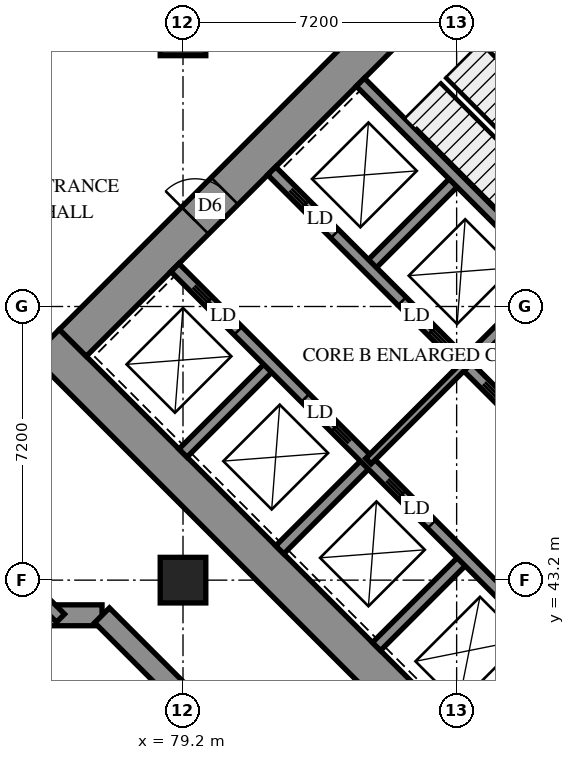
"""IFC4 building model, lengths in metres.
Left out: names, types, materials, properties, quantities, classifications, styles, units other than length and angle.
Written with IfcOpenShell. Run it as: python <this file> out.ifc"""

import sys

from ifc_helpers import new_model, si_unit, direction, frame, frame_2d, origin, origin_2d, place, context, subcontext, project, spatial, polyline, rectangle, outline, extrude, element, fill, save


model = new_model("IFC4")
c1 = context("Model", 3, precision=1e-05, world=origin(), true_north=direction((0.0, 1.0)))
c2 = subcontext(c1, "Body", "Model", "MODEL_VIEW")
j1 = project(units=[si_unit("LENGTHUNIT", "METRE"), si_unit("PLANEANGLEUNIT", "RADIAN")], contexts=[c1])
p1 = place(None, origin())
s1 = spatial("IfcSite", under=j1, at=p1, CompositionType="ELEMENT")
p2 = place(p1, origin())
s2 = spatial("IfcBuilding", under=s1, at=p2, CompositionType="ELEMENT")
p3 = place(p2, origin())
s3 = spatial("IfcBuildingStorey", under=s2, at=p3, CompositionType="ELEMENT", Elevation=0.0)
for number, where, z_axis, x_axis in (
    (1, (79.2, 43.2, 0.0), (0.0, 0.0, 1.0), (1.0, 0.0, 0.0)),
    (2, (79.2, 57.6, 0.0), (0.0, 0.0, 1.0), (1.0, 0.0, 0.0)),
):
    element("IfcColumn", number, at=place(p3, frame(where, z_axis=z_axis, x_axis=x_axis)), inside=s3, PredefinedType="COLUMN", context=c2, shape_type="SweptSolid", body=[
        extrude(rectangle(XDim=1.2, YDim=1.2, at=origin_2d()), origin(), (0.0, 0.0, 1.0), 5.6),
    ])
p4 = place(p3, frame((75.594, 49.443, -0.4), z_axis=(0.0, 0.0, 1.0), x_axis=(0.7071037324, -0.70710983, 0.0)))
e3 = element("IfcWall", 3, at=p4, inside=s3, PredefinedType="SHEAR", context=c2, shape_type="SweptSolid", body=[
    extrude(rectangle(XDim=16.4, YDim=1.0, at=frame_2d((8.2, 0.0))), origin(), (0.0, 0.0, 1.0), 5.3),
])
p5 = place(p3, frame((86.483, 60.333, -0.4), z_axis=(0.0, 0.0, 1.0), x_axis=(0.70710983, -0.7071037324, 0.0)))
e4 = element("IfcWall", 4, at=p5, inside=s3, PredefinedType="SHEAR", context=c2, shape_type="SweptSolid", body=[
    extrude(rectangle(XDim=16.4, YDim=1.0, at=frame_2d((8.2, 0.0))), origin(), (0.0, 0.0, 1.0), 5.3),
])
p6 = place(p5, frame((11.0, 0.0, 0.4)))
e5 = element("IfcOpeningElement", 5, at=p6, cuts=e4, PredefinedType="OPENING", context=c2, shape_type="SweptSolid", body=[
    extrude(rectangle(XDim=0.8, YDim=2.1, at=frame_2d((0.4, 1.05))), frame((0.0, 0.51, 0.0), z_axis=(0.0, -1.0, 0.0), x_axis=(1.0, 0.0, 0.0)), (0.0, 0.0, 1.0), 1.02),
])
p7 = place(p3, frame((76.301, 49.443, -0.4), z_axis=(0.0, 0.0, 1.0), x_axis=(0.7071067812, 0.7071067812, 0.0)))
e6 = element("IfcWall", 6, at=p7, inside=s3, PredefinedType="SHEAR", context=c2, shape_type="SweptSolid", body=[
    extrude(rectangle(XDim=14.4, YDim=1.0, at=frame_2d((7.2, 0.0))), origin(), (0.0, 0.0, 1.0), 5.3),
])
p8 = place(p7, frame((4.55, 0.0, 0.4)))
e7 = element("IfcOpeningElement", 7, at=p8, cuts=e6, PredefinedType="OPENING", context=c2, shape_type="SweptSolid", body=[
    extrude(rectangle(XDim=1.1, YDim=2.1, at=frame_2d((0.55, 1.05))), frame((0.0, 0.51, 0.0), z_axis=(0.0, -1.0, 0.0), x_axis=(1.0, 0.0, 0.0)), (0.0, 0.0, 1.0), 1.02),
])
p9 = place(p7, frame((11.35, 0.0, 0.4)))
e8 = element("IfcOpeningElement", 8, at=p9, cuts=e6, PredefinedType="OPENING", context=c2, shape_type="SweptSolid", body=[
    extrude(rectangle(XDim=1.1, YDim=2.1, at=frame_2d((0.55, 1.05))), frame((0.0, 0.51, 0.0), z_axis=(0.0, -1.0, 0.0), x_axis=(1.0, 0.0, 0.0)), (0.0, 0.0, 1.0), 1.02),
])
p10 = place(p3, frame((87.19, 38.554, -0.4), z_axis=(0.0, 0.0, 1.0), x_axis=(0.707103309, 0.7071102534, 0.0)))
e9 = element("IfcWall", 9, at=p10, inside=s3, PredefinedType="SHEAR", context=c2, shape_type="SweptSolid", body=[
    extrude(rectangle(XDim=14.4, YDim=1.0, at=frame_2d((7.2, 0.0))), origin(), (0.0, 0.0, 1.0), 5.3),
])
p11 = place(p10, frame((4.55, 0.0, 0.4)))
e10 = element("IfcOpeningElement", 10, at=p11, cuts=e9, PredefinedType="OPENING", context=c2, shape_type="SweptSolid", body=[
    extrude(rectangle(XDim=1.1, YDim=2.1, at=frame_2d((0.55, 1.05))), frame((0.0, 0.51, 0.0), z_axis=(0.0, -1.0, 0.0), x_axis=(1.0, 0.0, 0.0)), (0.0, 0.0, 1.0), 1.02),
])
p12 = place(p10, frame((11.35, 0.0, 0.4)))
e11 = element("IfcOpeningElement", 11, at=p12, cuts=e9, PredefinedType="OPENING", context=c2, shape_type="SweptSolid", body=[
    extrude(rectangle(XDim=1.1, YDim=2.1, at=frame_2d((0.55, 1.05))), frame((0.0, 0.51, 0.0), z_axis=(0.0, -1.0, 0.0), x_axis=(1.0, 0.0, 0.0)), (0.0, 0.0, 1.0), 1.02),
])
for number, where, z_axis, x_axis in (
    (12, (79.2, 46.544, 0.0), (0.0, 0.0, 1.0), (0.707, 0.707, 0.0)),
    (13, (84.079, 51.423, 0.0), (0.0, 0.0, 1.0), (0.707, 0.707, 0.0)),
):
    element("IfcWall", number, at=place(p3, frame(where, z_axis=z_axis, x_axis=x_axis)), inside=s3, PredefinedType="SOLIDWALL", context=c2, shape_type="SweptSolid", body=[
        extrude(rectangle(XDim=3.3, YDim=0.3, at=frame_2d((1.65, 0.0))), origin(), (0.0, 0.0, 1.0), 5.6),
    ])
p13 = place(p3, frame((81.746, 43.999, 0.0), z_axis=(0.0, 0.0, 1.0), x_axis=(0.7071067812, 0.7071067812, 0.0)))
e14 = element("IfcWall", 14, at=p13, inside=s3, PredefinedType="SOLIDWALL", context=c2, shape_type="SweptSolid", body=[
    extrude(rectangle(XDim=3.3, YDim=0.3, at=frame_2d((1.65, 0.0))), origin(), (0.0, 0.0, 1.0), 5.6),
])
p14 = place(p3, frame((86.625, 48.878, 0.0), z_axis=(0.0, 0.0, 1.0), x_axis=(0.7071067812, 0.7071067812, 0.0)))
e15 = element("IfcWall", 15, at=p14, inside=s3, PredefinedType="SOLIDWALL", context=c2, shape_type="SweptSolid", body=[
    extrude(rectangle(XDim=3.3, YDim=0.3, at=frame_2d((1.65, 0.0))), origin(), (0.0, 0.0, 1.0), 5.6),
])
p15 = place(p3, frame((84.291, 41.453, 0.0), z_axis=(0.0, 0.0, 1.0), x_axis=(0.7071067812, 0.7071067812, 0.0)))
e16 = element("IfcWall", 16, at=p15, inside=s3, PredefinedType="SOLIDWALL", context=c2, shape_type="SweptSolid", body=[
    extrude(rectangle(XDim=3.3, YDim=0.3, at=frame_2d((1.65, 0.0))), origin(), (0.0, 0.0, 1.0), 5.6),
])
p16 = place(p3, frame((78.988, 51.423, 0.0), z_axis=(0.0, 0.0, 1.0), x_axis=(0.7071067812, -0.7071067812, 0.0)))
e17 = element("IfcWall", 17, at=p16, inside=s3, PredefinedType="SOLIDWALL", context=c2, shape_type="SweptSolid", body=[
    extrude(rectangle(XDim=14.4, YDim=0.3, at=frame_2d((7.2, 0.0))), origin(), (0.0, 0.0, 1.0), 5.6),
])
p17 = place(p16, frame((1.25, 0.0, 0.0)))
e18 = element("IfcOpeningElement", 18, at=p17, cuts=e17, PredefinedType="OPENING", context=c2, shape_type="SweptSolid", body=[
    extrude(rectangle(XDim=1.1, YDim=2.1, at=frame_2d((0.55, 1.05))), frame((0.0, 0.16, 0.0), z_axis=(0.0, -1.0, 0.0), x_axis=(1.0, 0.0, 0.0)), (0.0, 0.0, 1.0), 0.32),
])
p18 = place(p16, frame((4.85, 0.0, 0.0)))
e19 = element("IfcOpeningElement", 19, at=p18, cuts=e17, PredefinedType="OPENING", context=c2, shape_type="SweptSolid", body=[
    extrude(rectangle(XDim=1.1, YDim=2.1, at=frame_2d((0.55, 1.05))), frame((0.0, 0.16, 0.0), z_axis=(0.0, -1.0, 0.0), x_axis=(1.0, 0.0, 0.0)), (0.0, 0.0, 1.0), 0.32),
])
p19 = place(p16, frame((8.45, 0.0, 0.0)))
e20 = element("IfcOpeningElement", 20, at=p19, cuts=e17, PredefinedType="OPENING", context=c2, shape_type="SweptSolid", body=[
    extrude(rectangle(XDim=1.1, YDim=2.1, at=frame_2d((0.55, 1.05))), frame((0.0, 0.16, 0.0), z_axis=(0.0, -1.0, 0.0), x_axis=(1.0, 0.0, 0.0)), (0.0, 0.0, 1.0), 0.32),
])
p20 = place(p16, frame((12.05, 0.0, 0.0)))
e21 = element("IfcOpeningElement", 21, at=p20, cuts=e17, PredefinedType="OPENING", context=c2, shape_type="SweptSolid", body=[
    extrude(rectangle(XDim=1.1, YDim=2.1, at=frame_2d((0.55, 1.05))), frame((0.0, 0.16, 0.0), z_axis=(0.0, -1.0, 0.0), x_axis=(1.0, 0.0, 0.0)), (0.0, 0.0, 1.0), 0.32),
])
p21 = place(p3, frame((81.534, 53.969, 0.0), z_axis=(0.0, 0.0, 1.0), x_axis=(0.707103309, -0.7071102534, 0.0)))
e22 = element("IfcWall", 22, at=p21, inside=s3, PredefinedType="SOLIDWALL", context=c2, shape_type="SweptSolid", body=[
    extrude(rectangle(XDim=14.4, YDim=0.3, at=frame_2d((7.2, 0.0))), origin(), (0.0, 0.0, 1.0), 5.6),
])
p22 = place(p21, frame((1.25, 0.0, 0.0)))
e23 = element("IfcOpeningElement", 23, at=p22, cuts=e22, PredefinedType="OPENING", context=c2, shape_type="SweptSolid", body=[
    extrude(rectangle(XDim=1.1, YDim=2.1, at=frame_2d((0.55, 1.05))), frame((0.0, 0.16, 0.0), z_axis=(0.0, -1.0, 0.0), x_axis=(1.0, 0.0, 0.0)), (0.0, 0.0, 1.0), 0.32),
])
p23 = place(p21, frame((4.85, 0.0, 0.0)))
e24 = element("IfcOpeningElement", 24, at=p23, cuts=e22, PredefinedType="OPENING", context=c2, shape_type="SweptSolid", body=[
    extrude(rectangle(XDim=1.1, YDim=2.1, at=frame_2d((0.55, 1.05))), frame((0.0, 0.16, 0.0), z_axis=(0.0, -1.0, 0.0), x_axis=(1.0, 0.0, 0.0)), (0.0, 0.0, 1.0), 0.32),
])
p24 = place(p21, frame((8.45, 0.0, 0.0)))
e25 = element("IfcOpeningElement", 25, at=p24, cuts=e22, PredefinedType="OPENING", context=c2, shape_type="SweptSolid", body=[
    extrude(rectangle(XDim=1.1, YDim=2.1, at=frame_2d((0.55, 1.05))), frame((0.0, 0.16, 0.0), z_axis=(0.0, -1.0, 0.0), x_axis=(1.0, 0.0, 0.0)), (0.0, 0.0, 1.0), 0.32),
])
p25 = place(p21, frame((12.05, 0.0, 0.0)))
e26 = element("IfcOpeningElement", 26, at=p25, cuts=e22, PredefinedType="OPENING", context=c2, shape_type="SweptSolid", body=[
    extrude(rectangle(XDim=1.1, YDim=2.1, at=frame_2d((0.55, 1.05))), frame((0.0, 0.16, 0.0), z_axis=(0.0, -1.0, 0.0), x_axis=(1.0, 0.0, 0.0)), (0.0, 0.0, 1.0), 0.32),
])
p26 = place(p3, frame((83.867, 56.302, 0.0), z_axis=(0.0, 0.0, 1.0), x_axis=(0.7071137256, -0.7070998367, 0.0)))
e27 = element("IfcWall", 27, at=p26, inside=s3, PredefinedType="SOLIDWALL", context=c2, shape_type="SweptSolid", body=[
    extrude(rectangle(XDim=7.2, YDim=0.3, at=frame_2d((3.6, 0.0))), origin(), (0.0, 0.0, 1.0), 5.6),
])
p27 = place(p3, frame((117.843, 34.665, 0.0), z_axis=(0.0, 0.0, 1.0), x_axis=(-0.7071067812, 0.7071067812, 0.0)))
e28 = element("IfcWall", 28, at=p27, inside=s3, PredefinedType="SOLIDWALL", context=c2, shape_type="SweptSolid", body=[
    extrude(outline(polyline([(-0.275, -0.275), (54.222, -0.275), (53.994, 0.275), (0.275, 0.275), (-0.275, -0.275)])), origin(), (0.0, 0.0, 1.0), 5.6),
])
p28 = place(p27, frame((0.8, 0.0, 0.7)))
e29 = element("IfcOpeningElement", 29, at=p28, cuts=e28, PredefinedType="OPENING", context=c2, shape_type="SweptSolid", body=[
    extrude(rectangle(XDim=1.8, YDim=3.4, at=frame_2d((0.9, 1.7))), frame((0.0, 0.285, 0.0), z_axis=(0.0, -1.0, 0.0), x_axis=(1.0, 0.0, 0.0)), (0.0, 0.0, 1.0), 0.57),
])
p29 = place(p27, frame((4.225, 0.0, 0.7)))
e30 = element("IfcOpeningElement", 30, at=p29, cuts=e28, PredefinedType="OPENING", context=c2, shape_type="SweptSolid", body=[
    extrude(rectangle(XDim=1.8, YDim=3.4, at=frame_2d((0.9, 1.7))), frame((0.0, 0.285, 0.0), z_axis=(0.0, -1.0, 0.0), x_axis=(1.0, 0.0, 0.0)), (0.0, 0.0, 1.0), 0.57),
])
p30 = place(p27, frame((7.825, 0.0, 0.7)))
e31 = element("IfcOpeningElement", 31, at=p30, cuts=e28, PredefinedType="OPENING", context=c2, shape_type="SweptSolid", body=[
    extrude(rectangle(XDim=1.8, YDim=3.4, at=frame_2d((0.9, 1.7))), frame((0.0, 0.285, 0.0), z_axis=(0.0, -1.0, 0.0), x_axis=(1.0, 0.0, 0.0)), (0.0, 0.0, 1.0), 0.57),
])
p31 = place(p27, frame((11.425, 0.0, 0.7)))
e32 = element("IfcOpeningElement", 32, at=p31, cuts=e28, PredefinedType="OPENING", context=c2, shape_type="SweptSolid", body=[
    extrude(rectangle(XDim=1.8, YDim=3.4, at=frame_2d((0.9, 1.7))), frame((0.0, 0.285, 0.0), z_axis=(0.0, -1.0, 0.0), x_axis=(1.0, 0.0, 0.0)), (0.0, 0.0, 1.0), 0.57),
])
p32 = place(p27, frame((15.025, 0.0, 0.7)))
e33 = element("IfcOpeningElement", 33, at=p32, cuts=e28, PredefinedType="OPENING", context=c2, shape_type="SweptSolid", body=[
    extrude(rectangle(XDim=1.8, YDim=3.4, at=frame_2d((0.9, 1.7))), frame((0.0, 0.285, 0.0), z_axis=(0.0, -1.0, 0.0), x_axis=(1.0, 0.0, 0.0)), (0.0, 0.0, 1.0), 0.57),
])
p33 = place(p27, frame((22.225, 0.0, 0.7)))
e34 = element("IfcOpeningElement", 34, at=p33, cuts=e28, PredefinedType="OPENING", context=c2, shape_type="SweptSolid", body=[
    extrude(rectangle(XDim=1.8, YDim=3.4, at=frame_2d((0.9, 1.7))), frame((0.0, 0.285, 0.0), z_axis=(0.0, -1.0, 0.0), x_axis=(1.0, 0.0, 0.0)), (0.0, 0.0, 1.0), 0.57),
])
p34 = place(p27, frame((25.825, 0.0, 0.7)))
e35 = element("IfcOpeningElement", 35, at=p34, cuts=e28, PredefinedType="OPENING", context=c2, shape_type="SweptSolid", body=[
    extrude(rectangle(XDim=1.8, YDim=3.4, at=frame_2d((0.9, 1.7))), frame((0.0, 0.285, 0.0), z_axis=(0.0, -1.0, 0.0), x_axis=(1.0, 0.0, 0.0)), (0.0, 0.0, 1.0), 0.57),
])
p35 = place(p27, frame((29.425, 0.0, 0.7)))
e36 = element("IfcOpeningElement", 36, at=p35, cuts=e28, PredefinedType="OPENING", context=c2, shape_type="SweptSolid", body=[
    extrude(rectangle(XDim=1.8, YDim=3.4, at=frame_2d((0.9, 1.7))), frame((0.0, 0.285, 0.0), z_axis=(0.0, -1.0, 0.0), x_axis=(1.0, 0.0, 0.0)), (0.0, 0.0, 1.0), 0.57),
])
p36 = place(p27, frame((33.025, 0.0, 0.7)))
e37 = element("IfcOpeningElement", 37, at=p36, cuts=e28, PredefinedType="OPENING", context=c2, shape_type="SweptSolid", body=[
    extrude(rectangle(XDim=1.8, YDim=3.4, at=frame_2d((0.9, 1.7))), frame((0.0, 0.285, 0.0), z_axis=(0.0, -1.0, 0.0), x_axis=(1.0, 0.0, 0.0)), (0.0, 0.0, 1.0), 0.57),
])
p37 = place(p27, frame((36.625, 0.0, 0.7)))
e38 = element("IfcOpeningElement", 38, at=p37, cuts=e28, PredefinedType="OPENING", context=c2, shape_type="SweptSolid", body=[
    extrude(rectangle(XDim=1.8, YDim=3.4, at=frame_2d((0.9, 1.7))), frame((0.0, 0.285, 0.0), z_axis=(0.0, -1.0, 0.0), x_axis=(1.0, 0.0, 0.0)), (0.0, 0.0, 1.0), 0.57),
])
p38 = place(p27, frame((40.225, 0.0, 0.7)))
e39 = element("IfcOpeningElement", 39, at=p38, cuts=e28, PredefinedType="OPENING", context=c2, shape_type="SweptSolid", body=[
    extrude(rectangle(XDim=1.8, YDim=3.4, at=frame_2d((0.9, 1.7))), frame((0.0, 0.285, 0.0), z_axis=(0.0, -1.0, 0.0), x_axis=(1.0, 0.0, 0.0)), (0.0, 0.0, 1.0), 0.57),
])
p39 = place(p27, frame((47.425, 0.0, 0.7)))
e40 = element("IfcOpeningElement", 40, at=p39, cuts=e28, PredefinedType="OPENING", context=c2, shape_type="SweptSolid", body=[
    extrude(rectangle(XDim=1.8, YDim=3.4, at=frame_2d((0.9, 1.7))), frame((0.0, 0.285, 0.0), z_axis=(0.0, -1.0, 0.0), x_axis=(1.0, 0.0, 0.0)), (0.0, 0.0, 1.0), 0.57),
])
p40 = place(p27, frame((51.06, 0.0, 0.7)))
e41 = element("IfcOpeningElement", 41, at=p40, cuts=e28, PredefinedType="OPENING", context=c2, shape_type="SweptSolid", body=[
    extrude(rectangle(XDim=1.8, YDim=3.4, at=frame_2d((0.9, 1.7))), frame((0.0, 0.285, 0.0), z_axis=(0.0, -1.0, 0.0), x_axis=(1.0, 0.0, 0.0)), (0.0, 0.0, 1.0), 0.57),
])
p41 = place(p3, frame((72.925, 42.275, 0.0), z_axis=(0.0, 0.0, 1.0), x_axis=(1.0, 0.0, 0.0)))
e42 = element("IfcWall", 42, at=p41, inside=s3, PredefinedType="SOLIDWALL", context=c2, shape_type="SweptSolid", body=[
    extrude(outline(polyline([(0.275, -0.275), (4.031, -0.275), (4.259, 0.275), (-0.275, 0.275), (0.275, -0.275)])), origin(), (0.0, 0.0, 1.0), 5.6),
])
p42 = place(p41, frame((0.487, 0.0, 0.7)))
e43 = element("IfcOpeningElement", 43, at=p42, cuts=e42, PredefinedType="OPENING", context=c2, shape_type="SweptSolid", body=[
    extrude(rectangle(XDim=1.8, YDim=3.4, at=frame_2d((0.9, 1.7))), frame((0.0, 0.285, 0.0), z_axis=(0.0, -1.0, 0.0), x_axis=(1.0, 0.0, 0.0)), (0.0, 0.0, 1.0), 0.57),
])
p43 = place(p3, frame((77.07, 42.275, 0.0), z_axis=(0.0, 0.0, 1.0), x_axis=(0.7071067812, -0.7071067812, 0.0)))
e44 = element("IfcWall", 44, at=p43, inside=s3, PredefinedType="SOLIDWALL", context=c2, shape_type="SweptSolid", body=[
    extrude(outline(polyline([(0.114, -0.275), (39.288, -0.275), (38.737, 0.275), (-0.114, 0.275), (0.114, -0.275)])), origin(), (0.0, 0.0, 1.0), 5.6),
])
p44 = place(p43, frame((2.837, 0.0, 0.7)))
e45 = element("IfcOpeningElement", 45, at=p44, cuts=e44, PredefinedType="OPENING", context=c2, shape_type="SweptSolid", body=[
    extrude(rectangle(XDim=1.8, YDim=3.4, at=frame_2d((0.9, 1.7))), frame((0.0, 0.285, 0.0), z_axis=(0.0, -1.0, 0.0), x_axis=(1.0, 0.0, 0.0)), (0.0, 0.0, 1.0), 0.57),
])
p45 = place(p43, frame((6.588, 0.0, 0.7)))
e46 = element("IfcOpeningElement", 46, at=p45, cuts=e44, PredefinedType="OPENING", context=c2, shape_type="SweptSolid", body=[
    extrude(rectangle(XDim=1.8, YDim=3.4, at=frame_2d((0.9, 1.7))), frame((0.0, 0.285, 0.0), z_axis=(0.0, -1.0, 0.0), x_axis=(1.0, 0.0, 0.0)), (0.0, 0.0, 1.0), 0.57),
])
p46 = place(p43, frame((10.188, 0.0, 0.7)))
e47 = element("IfcOpeningElement", 47, at=p46, cuts=e44, PredefinedType="OPENING", context=c2, shape_type="SweptSolid", body=[
    extrude(rectangle(XDim=1.8, YDim=3.4, at=frame_2d((0.9, 1.7))), frame((0.0, 0.285, 0.0), z_axis=(0.0, -1.0, 0.0), x_axis=(1.0, 0.0, 0.0)), (0.0, 0.0, 1.0), 0.57),
])
p47 = place(p43, frame((17.387, 0.0, 0.7)))
e48 = element("IfcOpeningElement", 48, at=p47, cuts=e44, PredefinedType="OPENING", context=c2, shape_type="SweptSolid", body=[
    extrude(rectangle(XDim=1.8, YDim=3.4, at=frame_2d((0.9, 1.7))), frame((0.0, 0.285, 0.0), z_axis=(0.0, -1.0, 0.0), x_axis=(1.0, 0.0, 0.0)), (0.0, 0.0, 1.0), 0.57),
])
p48 = place(p43, frame((20.988, 0.0, 0.7)))
e49 = element("IfcOpeningElement", 49, at=p48, cuts=e44, PredefinedType="OPENING", context=c2, shape_type="SweptSolid", body=[
    extrude(rectangle(XDim=1.8, YDim=3.4, at=frame_2d((0.9, 1.7))), frame((0.0, 0.285, 0.0), z_axis=(0.0, -1.0, 0.0), x_axis=(1.0, 0.0, 0.0)), (0.0, 0.0, 1.0), 0.57),
])
p49 = place(p43, frame((24.587, 0.0, 0.7)))
e50 = element("IfcOpeningElement", 50, at=p49, cuts=e44, PredefinedType="OPENING", context=c2, shape_type="SweptSolid", body=[
    extrude(rectangle(XDim=1.8, YDim=3.4, at=frame_2d((0.9, 1.7))), frame((0.0, 0.285, 0.0), z_axis=(0.0, -1.0, 0.0), x_axis=(1.0, 0.0, 0.0)), (0.0, 0.0, 1.0), 0.57),
])
p50 = place(p43, frame((28.188, 0.0, 0.7)))
e51 = element("IfcOpeningElement", 51, at=p50, cuts=e44, PredefinedType="OPENING", context=c2, shape_type="SweptSolid", body=[
    extrude(rectangle(XDim=1.8, YDim=3.4, at=frame_2d((0.9, 1.7))), frame((0.0, 0.285, 0.0), z_axis=(0.0, -1.0, 0.0), x_axis=(1.0, 0.0, 0.0)), (0.0, 0.0, 1.0), 0.57),
])
p51 = place(p43, frame((31.788, 0.0, 0.7)))
e52 = element("IfcOpeningElement", 52, at=p51, cuts=e44, PredefinedType="OPENING", context=c2, shape_type="SweptSolid", body=[
    extrude(rectangle(XDim=1.8, YDim=3.4, at=frame_2d((0.9, 1.7))), frame((0.0, 0.285, 0.0), z_axis=(0.0, -1.0, 0.0), x_axis=(1.0, 0.0, 0.0)), (0.0, 0.0, 1.0), 0.57),
])
p52 = place(p43, frame((35.388, 0.0, 0.7)))
e53 = element("IfcOpeningElement", 53, at=p52, cuts=e44, PredefinedType="OPENING", context=c2, shape_type="SweptSolid", body=[
    extrude(rectangle(XDim=1.8, YDim=3.4, at=frame_2d((0.9, 1.7))), frame((0.0, 0.285, 0.0), z_axis=(0.0, -1.0, 0.0), x_axis=(1.0, 0.0, 0.0)), (0.0, 0.0, 1.0), 0.57),
])
p53 = place(p3, frame((84.079, 46.332, 0.0), z_axis=(0.0, 0.0, 1.0), x_axis=(0.7071067812, 0.7071067812, 0.0)))
e54 = element("IfcWall", 54, at=p53, inside=s3, PredefinedType="PARTITIONING", context=c2, shape_type="SweptSolid", body=[
    extrude(rectangle(XDim=3.6, YDim=0.2, at=frame_2d((1.8, 0.0))), origin(), (0.0, 0.0, 1.0), 5.6),
])
p54 = place(p3, frame((104.055, 48.559, 0.0), z_axis=(0.0, 0.0, 1.0), x_axis=(-0.7071067812, -0.7071067812, 0.0)))
e55 = element("IfcWall", 55, at=p54, inside=s3, PredefinedType="PARTITIONING", context=c2, shape_type="SweptSolid", body=[
    extrude(rectangle(XDim=23.6, YDim=0.3, at=frame_2d((11.8, 0.0))), origin(), (0.0, 0.0, 1.0), 5.6),
])
p55 = place(p54, frame((10.8, 0.0, 0.0)))
e56 = element("IfcOpeningElement", 56, at=p55, cuts=e55, PredefinedType="OPENING", context=c2, shape_type="SweptSolid", body=[
    extrude(rectangle(XDim=1.8, YDim=2.4, at=frame_2d((0.9, 1.2))), frame((0.0, 0.16, 0.0), z_axis=(0.0, -1.0, 0.0), x_axis=(1.0, 0.0, 0.0)), (0.0, 0.0, 1.0), 0.32),
])
p56 = place(p54, frame((18.0, 0.0, 0.0)))
e57 = element("IfcOpeningElement", 57, at=p56, cuts=e55, PredefinedType="OPENING", context=c2, shape_type="SweptSolid", body=[
    extrude(rectangle(XDim=1.8, YDim=2.4, at=frame_2d((0.9, 1.2))), frame((0.0, 0.16, 0.0), z_axis=(0.0, -1.0, 0.0), x_axis=(1.0, 0.0, 0.0)), (0.0, 0.0, 1.0), 0.32),
])
p57 = place(p54, frame((6.6, 0.0, 0.0)))
e58 = element("IfcOpeningElement", 58, at=p57, cuts=e55, PredefinedType="OPENING", context=c2, shape_type="SweptSolid", body=[
    extrude(rectangle(XDim=1.0, YDim=2.1, at=frame_2d((0.5, 1.05))), frame((0.0, 0.16, 0.0), z_axis=(0.0, -1.0, 0.0), x_axis=(1.0, 0.0, 0.0)), (0.0, 0.0, 1.0), 0.32),
])
p58 = place(p3, frame((75.978, 42.2, 0.0), z_axis=(0.0, 0.0, 1.0), x_axis=(-0.7071067812, 0.7071067812, 0.0)))
e59 = element("IfcWall", 59, at=p58, inside=s3, PredefinedType="PARTITIONING", context=c2, shape_type="SweptSolid", body=[
    extrude(rectangle(XDim=4.03, YDim=0.3, at=frame_2d((2.015, 0.0))), origin(), (0.0, 0.0, 1.0), 5.6),
])
p59 = place(p8, origin())
e60 = element("IfcDoor", 60, at=p59, inside=s3, OperationType="DOUBLE_DOOR_SINGLE_SWING", PredefinedType="DOOR", context=c2, shape_type="SweptSolid", body=[
    extrude(rectangle(XDim=1.1, YDim=2.1, at=frame_2d((0.55, 1.05))), frame((0.0, 0.025, 0.0), z_axis=(0.0, -1.0, 0.0), x_axis=(1.0, 0.0, 0.0)), (0.0, 0.0, 1.0), 0.05),
])
fill(e7, e60)
p60 = place(p17, origin())
e61 = element("IfcDoor", 61, at=p60, inside=s3, OperationType="SLIDING_TO_LEFT", PredefinedType="DOOR", context=c2, shape_type="SweptSolid", body=[
    extrude(rectangle(XDim=1.1, YDim=2.1, at=frame_2d((0.55, 1.05))), frame((0.0, 0.025, 0.0), z_axis=(0.0, -1.0, 0.0), x_axis=(1.0, 0.0, 0.0)), (0.0, 0.0, 1.0), 0.05),
])
fill(e18, e61)
p61 = place(p18, origin())
e62 = element("IfcDoor", 62, at=p61, inside=s3, OperationType="SLIDING_TO_RIGHT", PredefinedType="DOOR", context=c2, shape_type="SweptSolid", body=[
    extrude(rectangle(XDim=1.1, YDim=2.1, at=frame_2d((0.55, 1.05))), frame((0.0, 0.025, 0.0), z_axis=(0.0, -1.0, 0.0), x_axis=(1.0, 0.0, 0.0)), (0.0, 0.0, 1.0), 0.05),
])
fill(e19, e62)
p62 = place(p19, origin())
e63 = element("IfcDoor", 63, at=p62, inside=s3, OperationType="SLIDING_TO_LEFT", PredefinedType="DOOR", context=c2, shape_type="SweptSolid", body=[
    extrude(rectangle(XDim=1.1, YDim=2.1, at=frame_2d((0.55, 1.05))), frame((0.0, 0.025, 0.0), z_axis=(0.0, -1.0, 0.0), x_axis=(1.0, 0.0, 0.0)), (0.0, 0.0, 1.0), 0.05),
])
fill(e20, e63)
p63 = place(p22, origin())
e64 = element("IfcDoor", 64, at=p63, inside=s3, OperationType="SLIDING_TO_LEFT", PredefinedType="DOOR", context=c2, shape_type="SweptSolid", body=[
    extrude(rectangle(XDim=1.1, YDim=2.1, at=frame_2d((0.55, 1.05))), frame((0.0, 0.025, 0.0), z_axis=(0.0, -1.0, 0.0), x_axis=(1.0, 0.0, 0.0)), (0.0, 0.0, 1.0), 0.05),
])
fill(e23, e64)
p64 = place(p23, origin())
e65 = element("IfcDoor", 65, at=p64, inside=s3, OperationType="SLIDING_TO_RIGHT", PredefinedType="DOOR", context=c2, shape_type="SweptSolid", body=[
    extrude(rectangle(XDim=1.1, YDim=2.1, at=frame_2d((0.55, 1.05))), frame((0.0, 0.025, 0.0), z_axis=(0.0, -1.0, 0.0), x_axis=(1.0, 0.0, 0.0)), (0.0, 0.0, 1.0), 0.05),
])
fill(e24, e65)
save(model, sys.argv[1])
